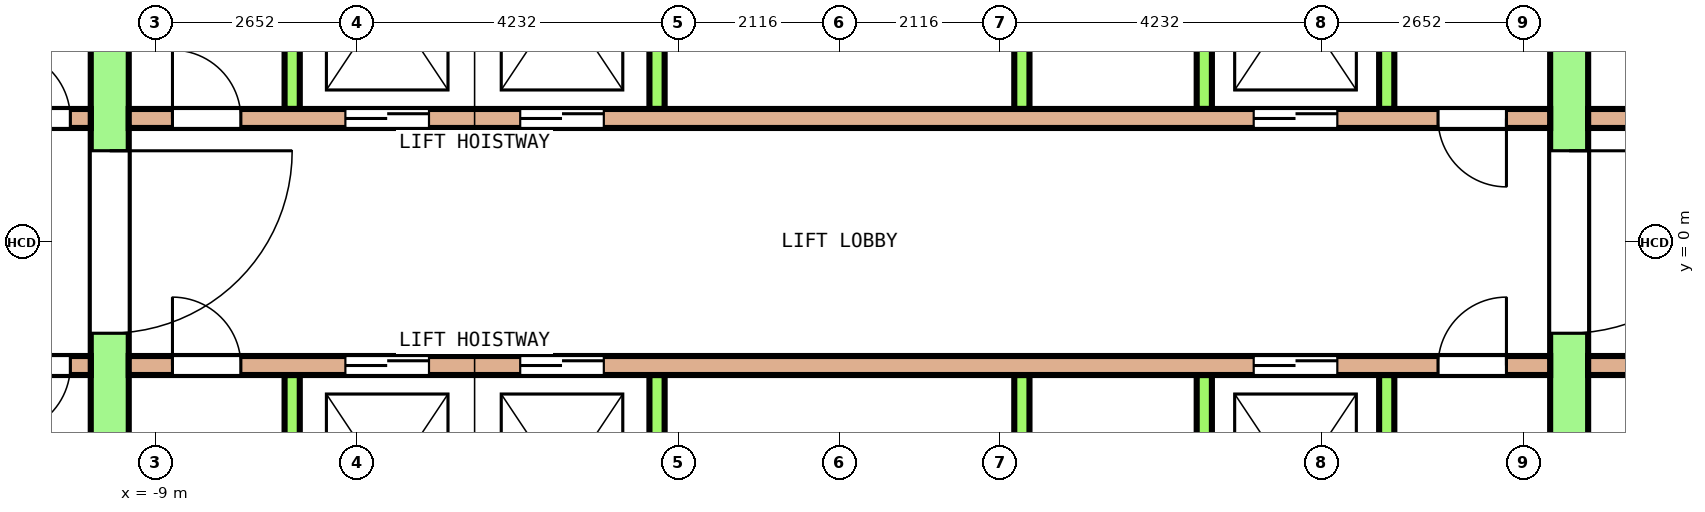
"""IFC4 building model, lengths in metres.
Left out: names, types, materials, properties, quantities, classifications, styles, units other than length and angle.
Written with IfcOpenShell. Run it as: python <this file> out.ifc"""

import sys

from ifc_helpers import new_model, si_unit, direction, frame, frame_2d, origin, place, context, subcontext, project, spatial, rectangle, extrude, element, fill, save


model = new_model("IFC4")
c1 = context("Model", 3, precision=1e-05, world=origin(), true_north=direction((0.0, 1.0)))
c2 = subcontext(c1, "Body", "Model", "MODEL_VIEW")
j1 = project(units=[si_unit("LENGTHUNIT", "METRE"), si_unit("PLANEANGLEUNIT", "RADIAN")], contexts=[c1])
p1 = place(None, origin())
s1 = spatial("IfcSite", under=j1, at=p1, CompositionType="ELEMENT")
p2 = place(p1, origin())
s2 = spatial("IfcBuilding", under=s1, at=p2, CompositionType="ELEMENT")
p3 = place(p2, frame((0.0, 0.0, 145.2)))
s3 = spatial("IfcBuildingStorey", under=s2, at=p3, CompositionType="ELEMENT", Elevation=145.2)
p4 = place(p3, frame((-9.6, -7.75, 0.0), z_axis=(0.0, 0.0, 1.0), x_axis=(0.0, 1.0, 0.0)))
e1 = element("IfcWall", 1, at=p4, inside=s3, PredefinedType="SHEAR", context=c2, shape_type="SweptSolid", body=[
    extrude(rectangle(XDim=15.5, YDim=0.5, at=frame_2d((7.75, 0.0))), origin(), (0.0, 0.0, 1.0), 4.1),
])
p5 = place(p4, frame((6.55, 0.0, 0.0)))
e2 = element("IfcOpeningElement", 2, at=p5, cuts=e1, PredefinedType="OPENING", context=c2, shape_type="SweptSolid", body=[
    extrude(rectangle(XDim=2.4, YDim=2.1, at=frame_2d((1.2, 1.05))), frame((0.0, 0.26, 0.0), z_axis=(0.0, -1.0, 0.0), x_axis=(1.0, 0.0, 0.0)), (0.0, 0.0, 1.0), 0.52),
])
p6 = place(p4, frame((13.45, 0.0, 0.0)))
e3 = element("IfcOpeningElement", 3, at=p6, cuts=e1, PredefinedType="OPENING", context=c2, shape_type="SweptSolid", body=[
    extrude(rectangle(XDim=1.2, YDim=2.1, at=frame_2d((0.6, 1.05))), frame((0.0, 0.26, 0.0), z_axis=(0.0, -1.0, 0.0), x_axis=(1.0, 0.0, 0.0)), (0.0, 0.0, 1.0), 0.52),
])
p7 = place(p4, frame((0.85, 0.0, 0.0)))
e4 = element("IfcOpeningElement", 4, at=p7, cuts=e1, PredefinedType="OPENING", context=c2, shape_type="SweptSolid", body=[
    extrude(rectangle(XDim=1.2, YDim=2.1, at=frame_2d((0.6, 1.05))), frame((0.0, 0.26, 0.0), z_axis=(0.0, -1.0, 0.0), x_axis=(1.0, 0.0, 0.0)), (0.0, 0.0, 1.0), 0.52),
])
p8 = place(p3, frame((9.6, -7.75, 0.0), z_axis=(0.0, 0.0, 1.0), x_axis=(0.0, 1.0, 0.0)))
e5 = element("IfcWall", 5, at=p8, inside=s3, PredefinedType="SHEAR", context=c2, shape_type="SweptSolid", body=[
    extrude(rectangle(XDim=15.5, YDim=0.5, at=frame_2d((7.75, 0.0))), origin(), (0.0, 0.0, 1.0), 4.1),
])
p9 = place(p8, frame((6.55, 0.0, 0.0)))
e6 = element("IfcOpeningElement", 6, at=p9, cuts=e5, PredefinedType="OPENING", context=c2, shape_type="SweptSolid", body=[
    extrude(rectangle(XDim=2.4, YDim=2.1, at=frame_2d((1.2, 1.05))), frame((0.0, 0.26, 0.0), z_axis=(0.0, -1.0, 0.0), x_axis=(1.0, 0.0, 0.0)), (0.0, 0.0, 1.0), 0.52),
])
p10 = place(p8, frame((13.45, 0.0, 0.0)))
e7 = element("IfcOpeningElement", 7, at=p10, cuts=e5, PredefinedType="OPENING", context=c2, shape_type="SweptSolid", body=[
    extrude(rectangle(XDim=1.2, YDim=2.1, at=frame_2d((0.6, 1.05))), frame((0.0, 0.26, 0.0), z_axis=(0.0, -1.0, 0.0), x_axis=(1.0, 0.0, 0.0)), (0.0, 0.0, 1.0), 0.52),
])
p11 = place(p8, frame((0.95, 0.0, 0.0)))
e8 = element("IfcOpeningElement", 8, at=p11, cuts=e5, PredefinedType="OPENING", context=c2, shape_type="SweptSolid", body=[
    extrude(rectangle(XDim=1.0, YDim=2.1, at=frame_2d((0.5, 1.05))), frame((0.0, 0.26, 0.0), z_axis=(0.0, -1.0, 0.0), x_axis=(1.0, 0.0, 0.0)), (0.0, 0.0, 1.0), 0.52),
])
p12 = place(p3, frame((-12.85, 1.625, 0.0), z_axis=(0.0, 0.0, 1.0), x_axis=(1.0, 0.0, 0.0)))
e9 = element("IfcWall", 9, at=p12, inside=s3, PredefinedType="SOLIDWALL", context=c2, shape_type="SweptSolid", body=[
    extrude(rectangle(XDim=3.0, YDim=0.25, at=frame_2d((1.5, 0.0))), origin(), (0.0, 0.0, 1.0), 4.1),
])
p13 = place(p12, frame((0.269, 0.0, 0.0)))
e10 = element("IfcOpeningElement", 10, at=p13, cuts=e9, PredefinedType="OPENING", context=c2, shape_type="SweptSolid", body=[
    extrude(rectangle(XDim=0.9, YDim=2.1, at=frame_2d((0.45, 1.05))), frame((0.0, 0.135, 0.0), z_axis=(0.0, -1.0, 0.0), x_axis=(1.0, 0.0, 0.0)), (0.0, 0.0, 1.0), 0.27),
])
p14 = place(p12, frame((1.831, 0.0, 0.0)))
e11 = element("IfcOpeningElement", 11, at=p14, cuts=e9, PredefinedType="OPENING", context=c2, shape_type="SweptSolid", body=[
    extrude(rectangle(XDim=0.9, YDim=2.1, at=frame_2d((0.45, 1.05))), frame((0.0, 0.135, 0.0), z_axis=(0.0, -1.0, 0.0), x_axis=(1.0, 0.0, 0.0)), (0.0, 0.0, 1.0), 0.27),
])
p15 = place(p3, frame((-9.35, 1.625, 0.0), z_axis=(0.0, 0.0, 1.0), x_axis=(1.0, 0.0, 0.0)))
e12 = element("IfcWall", 12, at=p15, inside=s3, PredefinedType="SOLIDWALL", context=c2, shape_type="SweptSolid", body=[
    extrude(rectangle(XDim=18.7, YDim=0.25, at=frame_2d((9.35, 0.0))), origin(), (0.0, 0.0, 1.0), 4.1),
])
p16 = place(p15, frame((2.85, 0.0, 0.0)))
e13 = element("IfcOpeningElement", 13, at=p16, cuts=e12, PredefinedType="OPENING", context=c2, shape_type="SweptSolid", body=[
    extrude(rectangle(XDim=1.1, YDim=2.1, at=frame_2d((0.55, 1.05))), frame((0.0, 0.135, 0.0), z_axis=(0.0, -1.0, 0.0), x_axis=(1.0, 0.0, 0.0)), (0.0, 0.0, 1.0), 0.27),
])
p17 = place(p15, frame((5.15, 0.0, 0.0)))
e14 = element("IfcOpeningElement", 14, at=p17, cuts=e12, PredefinedType="OPENING", context=c2, shape_type="SweptSolid", body=[
    extrude(rectangle(XDim=1.1, YDim=2.1, at=frame_2d((0.55, 1.05))), frame((0.0, 0.135, 0.0), z_axis=(0.0, -1.0, 0.0), x_axis=(1.0, 0.0, 0.0)), (0.0, 0.0, 1.0), 0.27),
])
p18 = place(p15, frame((14.8, 0.0, 0.0)))
e15 = element("IfcOpeningElement", 15, at=p18, cuts=e12, PredefinedType="OPENING", context=c2, shape_type="SweptSolid", body=[
    extrude(rectangle(XDim=1.1, YDim=2.1, at=frame_2d((0.55, 1.05))), frame((0.0, 0.135, 0.0), z_axis=(0.0, -1.0, 0.0), x_axis=(1.0, 0.0, 0.0)), (0.0, 0.0, 1.0), 0.27),
])
p19 = place(p15, frame((0.575, 0.0, 0.0)))
e16 = element("IfcOpeningElement", 16, at=p19, cuts=e12, PredefinedType="OPENING", context=c2, shape_type="SweptSolid", body=[
    extrude(rectangle(XDim=0.9, YDim=2.1, at=frame_2d((0.45, 1.05))), frame((0.0, 0.135, 0.0), z_axis=(0.0, -1.0, 0.0), x_axis=(1.0, 0.0, 0.0)), (0.0, 0.0, 1.0), 0.27),
])
p20 = place(p15, frame((17.225, 0.0, 0.0)))
e17 = element("IfcOpeningElement", 17, at=p20, cuts=e12, PredefinedType="OPENING", context=c2, shape_type="SweptSolid", body=[
    extrude(rectangle(XDim=0.9, YDim=2.1, at=frame_2d((0.45, 1.05))), frame((0.0, 0.135, 0.0), z_axis=(0.0, -1.0, 0.0), x_axis=(1.0, 0.0, 0.0)), (0.0, 0.0, 1.0), 0.27),
])
p21 = place(p3, frame((9.85, 1.625, 0.0), z_axis=(0.0, 0.0, 1.0), x_axis=(1.0, 0.0, 0.0)))
e18 = element("IfcWall", 18, at=p21, inside=s3, PredefinedType="SOLIDWALL", context=c2, shape_type="SweptSolid", body=[
    extrude(rectangle(XDim=3.0, YDim=0.25, at=frame_2d((1.5, 0.0))), origin(), (0.0, 0.0, 1.0), 4.1),
])
p22 = place(p21, frame((1.05, 0.0, 0.0)))
e19 = element("IfcOpeningElement", 19, at=p22, cuts=e18, PredefinedType="OPENING", context=c2, shape_type="SweptSolid", body=[
    extrude(rectangle(XDim=0.9, YDim=2.1, at=frame_2d((0.45, 1.05))), frame((0.0, 0.135, 0.0), z_axis=(0.0, -1.0, 0.0), x_axis=(1.0, 0.0, 0.0)), (0.0, 0.0, 1.0), 0.27),
])
for number, where, z_axis, x_axis in (
    (20, (-7.2, 1.75, 0.0), (0.0, 0.0, 1.0), (0.0, 1.0, 0.0)),
    (21, (-2.4, 1.75, 0.0), (0.0, 0.0, 1.0), (0.0, 1.0, 0.0)),
    (22, (2.4, 1.75, 0.0), (0.0, 0.0, 1.0), (0.0, 1.0, 0.0)),
    (23, (4.8, 1.75, 0.0), (0.0, 0.0, 1.0), (0.0, 1.0, 0.0)),
    (24, (7.2, 1.75, 0.0), (0.0, 0.0, 1.0), (0.0, 1.0, 0.0)),
):
    element("IfcWall", number, at=place(p3, frame(where, z_axis=z_axis, x_axis=x_axis)), inside=s3, PredefinedType="SOLIDWALL", context=c2, shape_type="SweptSolid", body=[
        extrude(rectangle(XDim=2.9, YDim=0.2, at=frame_2d((1.45, 0.0))), origin(), (0.0, 0.0, 1.0), 4.1),
    ])
p23 = place(p3, frame((-12.85, -1.625, 0.0), z_axis=(0.0, 0.0, 1.0), x_axis=(1.0, 0.0, 0.0)))
e25 = element("IfcWall", 25, at=p23, inside=s3, PredefinedType="SOLIDWALL", context=c2, shape_type="SweptSolid", body=[
    extrude(rectangle(XDim=3.0, YDim=0.25, at=frame_2d((1.5, 0.0))), origin(), (0.0, 0.0, 1.0), 4.1),
])
p24 = place(p23, frame((0.269, 0.0, 0.0)))
e26 = element("IfcOpeningElement", 26, at=p24, cuts=e25, PredefinedType="OPENING", context=c2, shape_type="SweptSolid", body=[
    extrude(rectangle(XDim=0.9, YDim=2.1, at=frame_2d((0.45, 1.05))), frame((0.0, 0.135, 0.0), z_axis=(0.0, -1.0, 0.0), x_axis=(1.0, 0.0, 0.0)), (0.0, 0.0, 1.0), 0.27),
])
p25 = place(p23, frame((1.831, 0.0, 0.0)))
e27 = element("IfcOpeningElement", 27, at=p25, cuts=e25, PredefinedType="OPENING", context=c2, shape_type="SweptSolid", body=[
    extrude(rectangle(XDim=0.9, YDim=2.1, at=frame_2d((0.45, 1.05))), frame((0.0, 0.135, 0.0), z_axis=(0.0, -1.0, 0.0), x_axis=(1.0, 0.0, 0.0)), (0.0, 0.0, 1.0), 0.27),
])
p26 = place(p3, frame((-9.35, -1.625, 0.0), z_axis=(0.0, 0.0, 1.0), x_axis=(1.0, 0.0, 0.0)))
e28 = element("IfcWall", 28, at=p26, inside=s3, PredefinedType="SOLIDWALL", context=c2, shape_type="SweptSolid", body=[
    extrude(rectangle(XDim=18.7, YDim=0.25, at=frame_2d((9.35, 0.0))), origin(), (0.0, 0.0, 1.0), 4.1),
])
p27 = place(p26, frame((2.85, 0.0, 0.0)))
e29 = element("IfcOpeningElement", 29, at=p27, cuts=e28, PredefinedType="OPENING", context=c2, shape_type="SweptSolid", body=[
    extrude(rectangle(XDim=1.1, YDim=2.1, at=frame_2d((0.55, 1.05))), frame((0.0, 0.135, 0.0), z_axis=(0.0, -1.0, 0.0), x_axis=(1.0, 0.0, 0.0)), (0.0, 0.0, 1.0), 0.27),
])
p28 = place(p26, frame((5.15, 0.0, 0.0)))
e30 = element("IfcOpeningElement", 30, at=p28, cuts=e28, PredefinedType="OPENING", context=c2, shape_type="SweptSolid", body=[
    extrude(rectangle(XDim=1.1, YDim=2.1, at=frame_2d((0.55, 1.05))), frame((0.0, 0.135, 0.0), z_axis=(0.0, -1.0, 0.0), x_axis=(1.0, 0.0, 0.0)), (0.0, 0.0, 1.0), 0.27),
])
p29 = place(p26, frame((14.8, 0.0, 0.0)))
e31 = element("IfcOpeningElement", 31, at=p29, cuts=e28, PredefinedType="OPENING", context=c2, shape_type="SweptSolid", body=[
    extrude(rectangle(XDim=1.1, YDim=2.1, at=frame_2d((0.55, 1.05))), frame((0.0, 0.135, 0.0), z_axis=(0.0, -1.0, 0.0), x_axis=(1.0, 0.0, 0.0)), (0.0, 0.0, 1.0), 0.27),
])
p30 = place(p26, frame((0.575, 0.0, 0.0)))
e32 = element("IfcOpeningElement", 32, at=p30, cuts=e28, PredefinedType="OPENING", context=c2, shape_type="SweptSolid", body=[
    extrude(rectangle(XDim=0.9, YDim=2.1, at=frame_2d((0.45, 1.05))), frame((0.0, 0.135, 0.0), z_axis=(0.0, -1.0, 0.0), x_axis=(1.0, 0.0, 0.0)), (0.0, 0.0, 1.0), 0.27),
])
p31 = place(p26, frame((17.225, 0.0, 0.0)))
e33 = element("IfcOpeningElement", 33, at=p31, cuts=e28, PredefinedType="OPENING", context=c2, shape_type="SweptSolid", body=[
    extrude(rectangle(XDim=0.9, YDim=2.1, at=frame_2d((0.45, 1.05))), frame((0.0, 0.135, 0.0), z_axis=(0.0, -1.0, 0.0), x_axis=(1.0, 0.0, 0.0)), (0.0, 0.0, 1.0), 0.27),
])
p32 = place(p3, frame((9.85, -1.625, 0.0), z_axis=(0.0, 0.0, 1.0), x_axis=(1.0, 0.0, 0.0)))
e34 = element("IfcWall", 34, at=p32, inside=s3, PredefinedType="SOLIDWALL", context=c2, shape_type="SweptSolid", body=[
    extrude(rectangle(XDim=3.0, YDim=0.25, at=frame_2d((1.5, 0.0))), origin(), (0.0, 0.0, 1.0), 4.1),
])
p33 = place(p32, frame((1.05, 0.0, 0.0)))
e35 = element("IfcOpeningElement", 35, at=p33, cuts=e34, PredefinedType="OPENING", context=c2, shape_type="SweptSolid", body=[
    extrude(rectangle(XDim=0.9, YDim=2.1, at=frame_2d((0.45, 1.05))), frame((0.0, 0.135, 0.0), z_axis=(0.0, -1.0, 0.0), x_axis=(1.0, 0.0, 0.0)), (0.0, 0.0, 1.0), 0.27),
])
for number, where, z_axis, x_axis in (
    (36, (-7.2, -4.65, 0.0), (0.0, 0.0, 1.0), (0.0, 1.0, 0.0)),
    (37, (-2.4, -4.65, 0.0), (0.0, 0.0, 1.0), (0.0, 1.0, 0.0)),
    (38, (2.4, -4.65, 0.0), (0.0, 0.0, 1.0), (0.0, 1.0, 0.0)),
    (39, (4.8, -4.65, 0.0), (0.0, 0.0, 1.0), (0.0, 1.0, 0.0)),
    (40, (7.2, -4.65, 0.0), (0.0, 0.0, 1.0), (0.0, 1.0, 0.0)),
):
    element("IfcWall", number, at=place(p3, frame(where, z_axis=z_axis, x_axis=x_axis)), inside=s3, PredefinedType="SOLIDWALL", context=c2, shape_type="SweptSolid", body=[
        extrude(rectangle(XDim=2.9, YDim=0.2, at=frame_2d((1.45, 0.0))), origin(), (0.0, 0.0, 1.0), 4.1),
    ])
p34 = place(p16, origin())
e41 = element("IfcDoor", 41, at=p34, inside=s3, OperationType="DOUBLE_DOOR_SLIDING", PredefinedType="DOOR", context=c2, shape_type="SweptSolid", body=[
    extrude(rectangle(XDim=1.1, YDim=2.1, at=frame_2d((0.55, 1.05))), frame((0.0, 0.075, 0.0), z_axis=(0.0, -1.0, 0.0), x_axis=(1.0, 0.0, 0.0)), (0.0, 0.0, 1.0), 0.15),
])
fill(e13, e41)
p35 = place(p17, origin())
e42 = element("IfcDoor", 42, at=p35, inside=s3, OperationType="DOUBLE_DOOR_SLIDING", PredefinedType="DOOR", context=c2, shape_type="SweptSolid", body=[
    extrude(rectangle(XDim=1.1, YDim=2.1, at=frame_2d((0.55, 1.05))), frame((0.0, 0.075, 0.0), z_axis=(0.0, -1.0, 0.0), x_axis=(1.0, 0.0, 0.0)), (0.0, 0.0, 1.0), 0.15),
])
fill(e14, e42)
p36 = place(p18, origin())
e43 = element("IfcDoor", 43, at=p36, inside=s3, OperationType="DOUBLE_DOOR_SLIDING", PredefinedType="DOOR", context=c2, shape_type="SweptSolid", body=[
    extrude(rectangle(XDim=1.1, YDim=2.1, at=frame_2d((0.55, 1.05))), frame((0.0, 0.075, 0.0), z_axis=(0.0, -1.0, 0.0), x_axis=(1.0, 0.0, 0.0)), (0.0, 0.0, 1.0), 0.15),
])
fill(e15, e43)
p37 = place(p27, origin())
e44 = element("IfcDoor", 44, at=p37, inside=s3, OperationType="DOUBLE_DOOR_SLIDING", PredefinedType="DOOR", context=c2, shape_type="SweptSolid", body=[
    extrude(rectangle(XDim=1.1, YDim=2.1, at=frame_2d((0.55, 1.05))), frame((0.0, 0.075, 0.0), z_axis=(0.0, -1.0, 0.0), x_axis=(1.0, 0.0, 0.0)), (0.0, 0.0, 1.0), 0.15),
])
fill(e29, e44)
p38 = place(p28, origin())
e45 = element("IfcDoor", 45, at=p38, inside=s3, OperationType="DOUBLE_DOOR_SLIDING", PredefinedType="DOOR", context=c2, shape_type="SweptSolid", body=[
    extrude(rectangle(XDim=1.1, YDim=2.1, at=frame_2d((0.55, 1.05))), frame((0.0, 0.075, 0.0), z_axis=(0.0, -1.0, 0.0), x_axis=(1.0, 0.0, 0.0)), (0.0, 0.0, 1.0), 0.15),
])
fill(e30, e45)
p39 = place(p29, origin())
e46 = element("IfcDoor", 46, at=p39, inside=s3, OperationType="DOUBLE_DOOR_SLIDING", PredefinedType="DOOR", context=c2, shape_type="SweptSolid", body=[
    extrude(rectangle(XDim=1.1, YDim=2.1, at=frame_2d((0.55, 1.05))), frame((0.0, 0.075, 0.0), z_axis=(0.0, -1.0, 0.0), x_axis=(1.0, 0.0, 0.0)), (0.0, 0.0, 1.0), 0.15),
])
fill(e31, e46)
p40 = place(p5, origin())
e47 = element("IfcDoor", 47, at=p40, inside=s3, OperationType="DOUBLE_DOOR_SINGLE_SWING", PredefinedType="DOOR", context=c2, shape_type="SweptSolid", body=[
    extrude(rectangle(XDim=2.4, YDim=2.1, at=frame_2d((1.2, 1.05))), frame((0.0, 0.2, 0.0), z_axis=(0.0, -1.0, 0.0), x_axis=(1.0, 0.0, 0.0)), (0.0, 0.0, 1.0), 0.4),
])
fill(e2, e47)
p41 = place(p9, origin())
e48 = element("IfcDoor", 48, at=p41, inside=s3, OperationType="DOUBLE_DOOR_SINGLE_SWING", PredefinedType="DOOR", context=c2, shape_type="SweptSolid", body=[
    extrude(rectangle(XDim=2.4, YDim=2.1, at=frame_2d((1.2, 1.05))), frame((0.0, 0.2, 0.0), z_axis=(0.0, -1.0, 0.0), x_axis=(1.0, 0.0, 0.0)), (0.0, 0.0, 1.0), 0.4),
])
fill(e6, e48)
p42 = place(p14, origin())
e49 = element("IfcDoor", 49, at=p42, inside=s3, OperationType="SINGLE_SWING_RIGHT", PredefinedType="DOOR", context=c2, shape_type="SweptSolid", body=[
    extrude(rectangle(XDim=0.9, YDim=2.1, at=frame_2d((0.45, 1.05))), frame((0.0, 0.075, 0.0), z_axis=(0.0, -1.0, 0.0), x_axis=(1.0, 0.0, 0.0)), (0.0, 0.0, 1.0), 0.15),
])
fill(e11, e49)
p43 = place(p19, origin())
e50 = element("IfcDoor", 50, at=p43, inside=s3, OperationType="SINGLE_SWING_LEFT", PredefinedType="DOOR", context=c2, shape_type="SweptSolid", body=[
    extrude(rectangle(XDim=0.9, YDim=2.1, at=frame_2d((0.45, 1.05))), frame((0.0, 0.075, 0.0), z_axis=(0.0, -1.0, 0.0), x_axis=(1.0, 0.0, 0.0)), (0.0, 0.0, 1.0), 0.15),
])
fill(e16, e50)
p44 = place(p20, origin())
e51 = element("IfcDoor", 51, at=p44, inside=s3, OperationType="SINGLE_SWING_RIGHT", PredefinedType="DOOR", context=c2, shape_type="SweptSolid", body=[
    extrude(rectangle(XDim=0.9, YDim=2.1, at=frame_2d((0.45, 1.05))), frame((0.0, 0.075, 0.0), z_axis=(0.0, -1.0, 0.0), x_axis=(1.0, 0.0, 0.0)), (0.0, 0.0, 1.0), 0.15),
])
fill(e17, e51)
p45 = place(p25, origin())
e52 = element("IfcDoor", 52, at=p45, inside=s3, OperationType="SINGLE_SWING_LEFT", PredefinedType="DOOR", context=c2, shape_type="SweptSolid", body=[
    extrude(rectangle(XDim=0.9, YDim=2.1, at=frame_2d((0.45, 1.05))), frame((0.0, 0.075, 0.0), z_axis=(0.0, -1.0, 0.0), x_axis=(1.0, 0.0, 0.0)), (0.0, 0.0, 1.0), 0.15),
])
fill(e27, e52)
p46 = place(p30, origin())
e53 = element("IfcDoor", 53, at=p46, inside=s3, OperationType="SINGLE_SWING_RIGHT", PredefinedType="DOOR", context=c2, shape_type="SweptSolid", body=[
    extrude(rectangle(XDim=0.9, YDim=2.1, at=frame_2d((0.45, 1.05))), frame((0.0, 0.075, 0.0), z_axis=(0.0, -1.0, 0.0), x_axis=(1.0, 0.0, 0.0)), (0.0, 0.0, 1.0), 0.15),
])
fill(e32, e53)
p47 = place(p31, origin())
e54 = element("IfcDoor", 54, at=p47, inside=s3, OperationType="SINGLE_SWING_LEFT", PredefinedType="DOOR", context=c2, shape_type="SweptSolid", body=[
    extrude(rectangle(XDim=0.9, YDim=2.1, at=frame_2d((0.45, 1.05))), frame((0.0, 0.075, 0.0), z_axis=(0.0, -1.0, 0.0), x_axis=(1.0, 0.0, 0.0)), (0.0, 0.0, 1.0), 0.15),
])
fill(e33, e54)
save(model, sys.argv[1])
